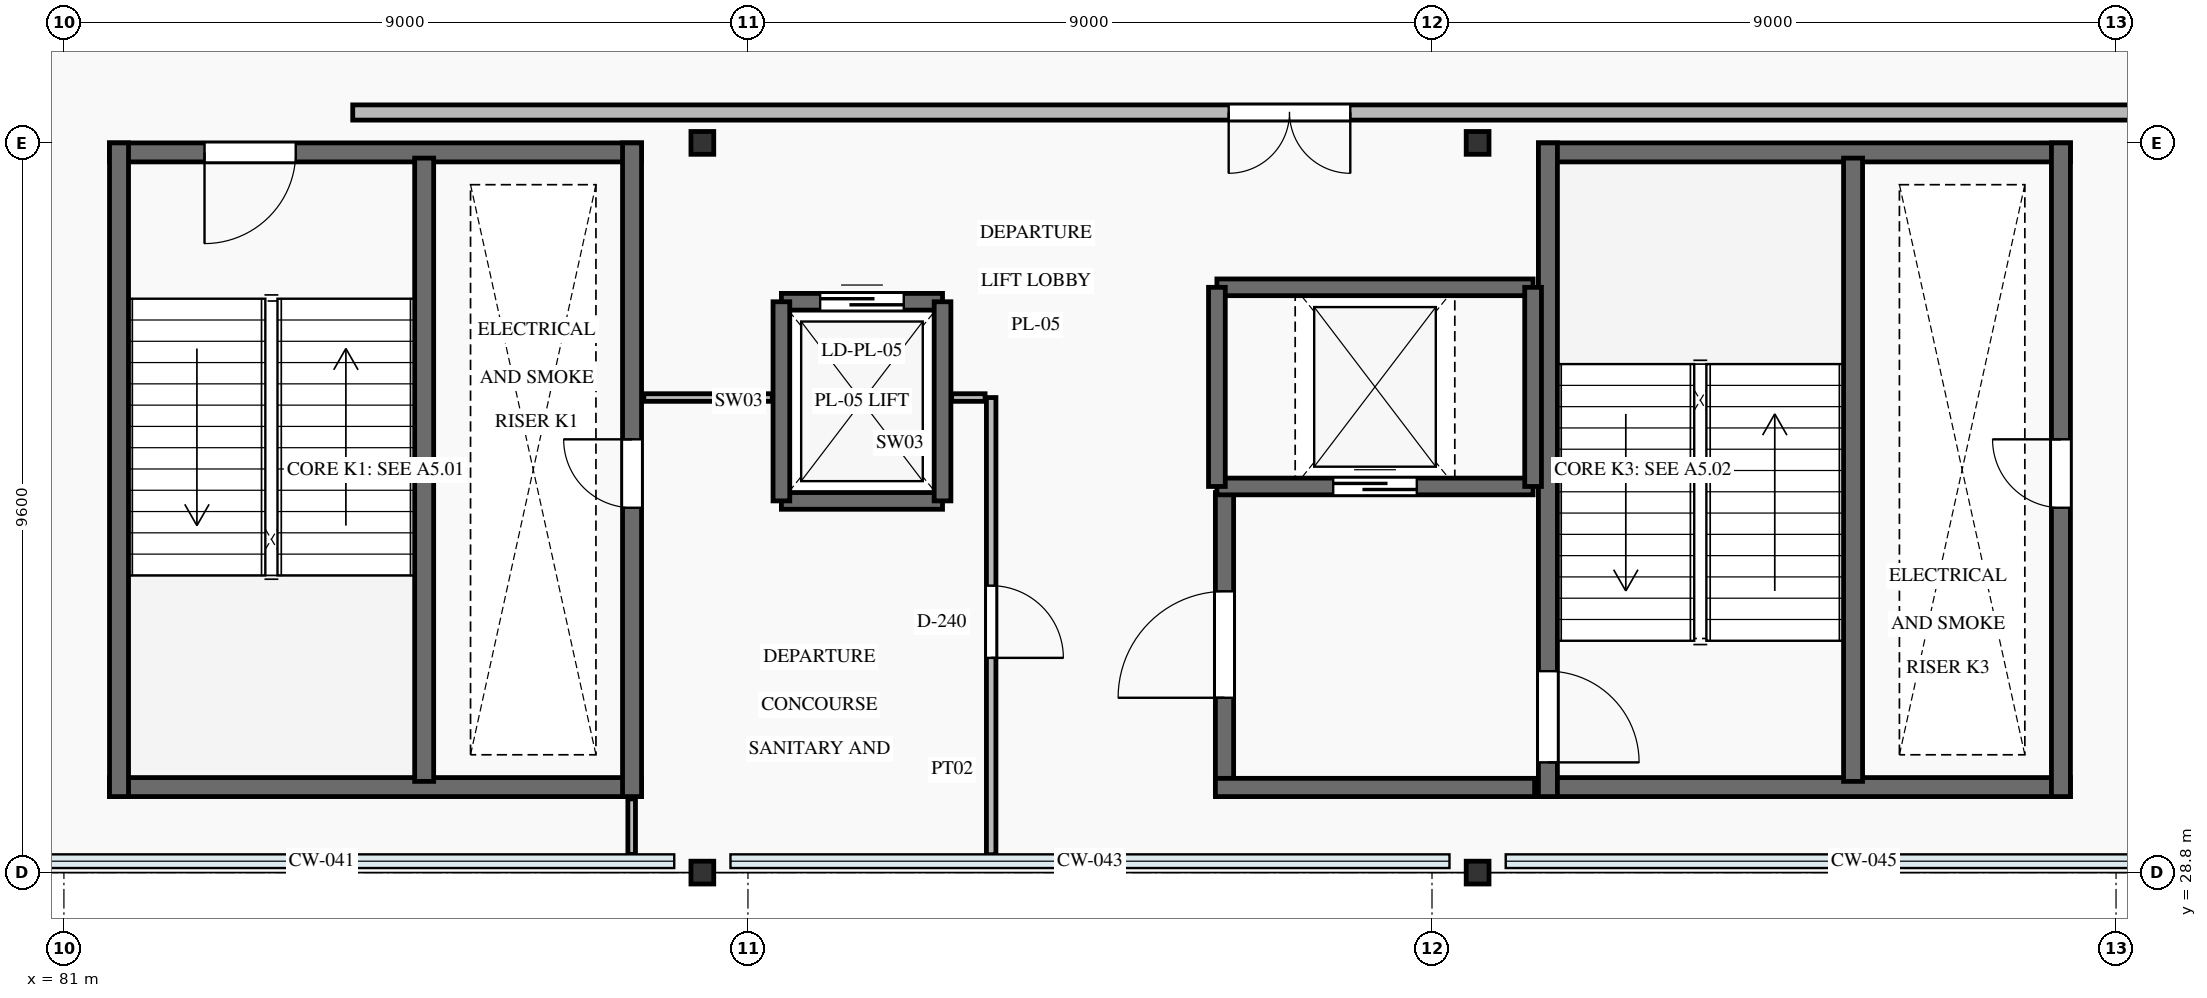
"""IFC4 building model, lengths in metres.
Left out: names, types, materials, properties, quantities, classifications, styles, units other than length and angle.
Written with IfcOpenShell. Run it as: python <this file> out.ifc"""

import sys

from ifc_helpers import new_model, si_unit, direction, frame, frame_2d, origin, origin_2d, place, context, subcontext, project, spatial, rectangle, i_section, extrude, element, fill, save


model = new_model("IFC4")
c1 = context("Model", 3, precision=1e-05, world=origin(), true_north=direction((0.0, 1.0)))
c2 = subcontext(c1, "Body", "Model", "MODEL_VIEW")
j1 = project(units=[si_unit("LENGTHUNIT", "METRE"), si_unit("PLANEANGLEUNIT", "RADIAN")], contexts=[c1])
p1 = place(None, origin())
s1 = spatial("IfcSite", under=j1, at=p1, CompositionType="ELEMENT")
p2 = place(p1, origin())
s2 = spatial("IfcBuilding", under=s1, at=p2, CompositionType="ELEMENT")
p3 = place(p2, frame((0.0, 0.0, 6.0)))
s3 = spatial("IfcBuildingStorey", under=s2, at=p3, CompositionType="ELEMENT", Elevation=6.0)
for number, where, z_axis, x_axis in (
    (1, (89.4, 28.8, 0.0), (0.0, 0.0, 1.0), (1.0, 0.0, 0.0)),
    (2, (89.4, 38.4, 0.0), (0.0, 0.0, 1.0), (1.0, 0.0, 0.0)),
    (3, (99.6, 28.8, 0.0), (0.0, 0.0, 1.0), (1.0, 0.0, 0.0)),
    (4, (99.6, 38.4, 0.0), (0.0, 0.0, 1.0), (1.0, 0.0, 0.0)),
):
    element("IfcColumn", number, at=place(p3, frame(where, z_axis=z_axis, x_axis=x_axis)), inside=s3, PredefinedType="COLUMN", context=c2, shape_type="SweptSolid", body=[
        extrude(i_section(OverallWidth=0.3, OverallDepth=0.3, WebThickness=0.011, FlangeThickness=0.019, FilletRadius=0.027, at=origin_2d()), origin(), (0.0, 0.0, 1.0), 4.8),
    ])
p4 = place(p3, frame((81.6, 29.925, 0.0), z_axis=(0.0, 0.0, 1.0), x_axis=(1.0, 0.0, 0.0)))
e5 = element("IfcWall", 5, at=p4, inside=s3, PredefinedType="SHEAR", context=c2, shape_type="SweptSolid", body=[
    extrude(rectangle(XDim=7.0, YDim=0.25, at=frame_2d((3.5, 0.0))), origin(), (0.0, 0.0, 1.0), 4.8),
])
p5 = place(p3, frame((81.6, 38.275, 0.0), z_axis=(0.0, 0.0, 1.0), x_axis=(1.0, 0.0, 0.0)))
e6 = element("IfcWall", 6, at=p5, inside=s3, PredefinedType="SHEAR", context=c2, shape_type="SweptSolid", body=[
    extrude(rectangle(XDim=7.0, YDim=0.25, at=frame_2d((3.5, 0.0))), origin(), (0.0, 0.0, 1.0), 4.8),
])
p6 = place(p5, frame((1.25, 0.0, 0.0)))
e7 = element("IfcOpeningElement", 7, at=p6, cuts=e6, PredefinedType="OPENING", context=c2, shape_type="SweptSolid", body=[
    extrude(rectangle(XDim=1.2, YDim=2.15, at=frame_2d((0.6, 1.075))), frame((0.0, 0.14, 0.0), z_axis=(0.0, -1.0, 0.0), x_axis=(1.0, 0.0, 0.0)), (0.0, 0.0, 1.0), 0.28),
])
p7 = place(p3, frame((81.725, 29.8, 0.0), z_axis=(0.0, 0.0, 1.0), x_axis=(0.0, 1.0, 0.0)))
e8 = element("IfcWall", 8, at=p7, inside=s3, PredefinedType="SHEAR", context=c2, shape_type="SweptSolid", body=[
    extrude(rectangle(XDim=8.6, YDim=0.25, at=frame_2d((4.3, 0.0))), origin(), (0.0, 0.0, 1.0), 4.8),
])
p8 = place(p3, frame((88.475, 29.8, 0.0), z_axis=(0.0, 0.0, 1.0), x_axis=(0.0, 1.0, 0.0)))
e9 = element("IfcWall", 9, at=p8, inside=s3, PredefinedType="SHEAR", context=c2, shape_type="SweptSolid", body=[
    extrude(rectangle(XDim=8.6, YDim=0.25, at=frame_2d((4.3, 0.0))), origin(), (0.0, 0.0, 1.0), 4.8),
])
p9 = place(p8, frame((3.8, 0.0, 0.0)))
e10 = element("IfcOpeningElement", 10, at=p9, cuts=e9, PredefinedType="OPENING", context=c2, shape_type="SweptSolid", body=[
    extrude(rectangle(XDim=0.9, YDim=2.05, at=frame_2d((0.45, 1.025))), frame((0.0, 0.14, 0.0), z_axis=(0.0, -1.0, 0.0), x_axis=(1.0, 0.0, 0.0)), (0.0, 0.0, 1.0), 0.28),
])
p10 = place(p3, frame((85.74, 30.0, 0.0), z_axis=(0.0, 0.0, 1.0), x_axis=(0.0, 1.0, 0.0)))
e11 = element("IfcWall", 11, at=p10, inside=s3, PredefinedType="SHEAR", context=c2, shape_type="SweptSolid", body=[
    extrude(rectangle(XDim=8.2, YDim=0.25, at=frame_2d((4.1, 0.0))), origin(), (0.0, 0.0, 1.0), 4.8),
])
for number, where, z_axis, x_axis in (
    (12, (100.4, 29.925, 0.0), (0.0, 0.0, 1.0), (1.0, 0.0, 0.0)),
    (13, (100.4, 38.275, 0.0), (0.0, 0.0, 1.0), (1.0, 0.0, 0.0)),
):
    element("IfcWall", number, at=place(p3, frame(where, z_axis=z_axis, x_axis=x_axis)), inside=s3, PredefinedType="SHEAR", context=c2, shape_type="SweptSolid", body=[
        extrude(rectangle(XDim=7.0, YDim=0.25, at=frame_2d((3.5, 0.0))), origin(), (0.0, 0.0, 1.0), 4.8),
    ])
p11 = place(p3, frame((100.525, 29.8, 0.0), z_axis=(0.0, 0.0, 1.0), x_axis=(0.0, 1.0, 0.0)))
e14 = element("IfcWall", 14, at=p11, inside=s3, PredefinedType="SHEAR", context=c2, shape_type="SweptSolid", body=[
    extrude(rectangle(XDim=8.6, YDim=0.25, at=frame_2d((4.3, 0.0))), origin(), (0.0, 0.0, 1.0), 4.8),
])
p12 = place(p11, frame((0.45, 0.0, 0.0)))
e15 = element("IfcOpeningElement", 15, at=p12, cuts=e14, PredefinedType="OPENING", context=c2, shape_type="SweptSolid", body=[
    extrude(rectangle(XDim=1.2, YDim=2.15, at=frame_2d((0.6, 1.075))), frame((0.0, 0.14, 0.0), z_axis=(0.0, -1.0, 0.0), x_axis=(1.0, 0.0, 0.0)), (0.0, 0.0, 1.0), 0.28),
])
p13 = place(p3, frame((107.275, 29.8, 0.0), z_axis=(0.0, 0.0, 1.0), x_axis=(0.0, 1.0, 0.0)))
e16 = element("IfcWall", 16, at=p13, inside=s3, PredefinedType="SHEAR", context=c2, shape_type="SweptSolid", body=[
    extrude(rectangle(XDim=8.6, YDim=0.25, at=frame_2d((4.3, 0.0))), origin(), (0.0, 0.0, 1.0), 4.8),
])
p14 = place(p13, frame((3.8, 0.0, 0.0)))
e17 = element("IfcOpeningElement", 17, at=p14, cuts=e16, PredefinedType="OPENING", context=c2, shape_type="SweptSolid", body=[
    extrude(rectangle(XDim=0.9, YDim=2.05, at=frame_2d((0.45, 1.025))), frame((0.0, 0.14, 0.0), z_axis=(0.0, -1.0, 0.0), x_axis=(1.0, 0.0, 0.0)), (0.0, 0.0, 1.0), 0.28),
])
p15 = place(p3, frame((104.54, 30.0, 0.0), z_axis=(0.0, 0.0, 1.0), x_axis=(0.0, 1.0, 0.0)))
e18 = element("IfcWall", 18, at=p15, inside=s3, PredefinedType="SHEAR", context=c2, shape_type="SweptSolid", body=[
    extrude(rectangle(XDim=8.2, YDim=0.25, at=frame_2d((4.1, 0.0))), origin(), (0.0, 0.0, 1.0), 4.8),
])
p16 = place(p3, frame((96.27, 29.8, 0.0), z_axis=(0.0, 0.0, 1.0), x_axis=(0.0, 1.0, 0.0)))
e19 = element("IfcWall", 19, at=p16, inside=s3, PredefinedType="SHEAR", context=c2, shape_type="SweptSolid", body=[
    extrude(rectangle(XDim=4.0, YDim=0.24, at=frame_2d((2.0, 0.0))), origin(), (0.0, 0.0, 1.0), 4.8),
])
p17 = place(p16, frame((1.3, 0.0, 0.0)))
e20 = element("IfcOpeningElement", 20, at=p17, cuts=e19, PredefinedType="OPENING", context=c2, shape_type="SweptSolid", body=[
    extrude(rectangle(XDim=1.4, YDim=2.2, at=frame_2d((0.7, 1.1))), frame((0.0, 0.135, 0.0), z_axis=(0.0, -1.0, 0.0), x_axis=(1.0, 0.0, 0.0)), (0.0, 0.0, 1.0), 0.27),
])
p18 = place(p3, frame((96.15, 29.92, 0.0), z_axis=(0.0, 0.0, 1.0), x_axis=(1.0, 0.0, 0.0)))
e21 = element("IfcWall", 21, at=p18, inside=s3, PredefinedType="SHEAR", context=c2, shape_type="SweptSolid", body=[
    extrude(rectangle(XDim=4.2, YDim=0.24, at=frame_2d((2.1, 0.0))), origin(), (0.0, 0.0, 1.0), 4.8),
])
p19 = place(p3, frame((90.44, 33.69, 0.0), z_axis=(0.0, 0.0, 1.0), x_axis=(1.0, 0.0, 0.0)))
e22 = element("IfcWall", 22, at=p19, inside=s3, PredefinedType="SHEAR", context=c2, shape_type="SweptSolid", body=[
    extrude(rectangle(XDim=2.12, YDim=0.22, at=frame_2d((1.06, 0.0))), origin(), (0.0, 0.0, 1.0), 4.8),
])
p20 = place(p3, frame((90.44, 36.31, 0.0), z_axis=(0.0, 0.0, 1.0), x_axis=(1.0, 0.0, 0.0)))
e23 = element("IfcWall", 23, at=p20, inside=s3, PredefinedType="SHEAR", context=c2, shape_type="SweptSolid", body=[
    extrude(rectangle(XDim=2.12, YDim=0.22, at=frame_2d((1.06, 0.0))), origin(), (0.0, 0.0, 1.0), 4.8),
])
p21 = place(p20, frame((0.51, 0.0, 0.0)))
e24 = element("IfcOpeningElement", 24, at=p21, cuts=e23, PredefinedType="OPENING", context=c2, shape_type="SweptSolid", body=[
    extrude(rectangle(XDim=1.1, YDim=2.15, at=frame_2d((0.55, 1.075))), frame((0.0, 0.125, 0.0), z_axis=(0.0, -1.0, 0.0), x_axis=(1.0, 0.0, 0.0)), (0.0, 0.0, 1.0), 0.25),
])
for number, where, z_axis, x_axis in (
    (25, (90.44, 33.69, 0.0), (0.0, 0.0, 1.0), (0.0, 1.0, 0.0)),
    (26, (92.56, 33.69, 0.0), (0.0, 0.0, 1.0), (0.0, 1.0, 0.0)),
):
    element("IfcWall", number, at=place(p3, frame(where, z_axis=z_axis, x_axis=x_axis)), inside=s3, PredefinedType="SHEAR", context=c2, shape_type="SweptSolid", body=[
        extrude(rectangle(XDim=2.62, YDim=0.22, at=frame_2d((1.31, 0.0))), origin(), (0.0, 0.0, 1.0), 4.8),
    ])
p22 = place(p3, frame((96.17, 33.88, 0.0), z_axis=(0.0, 0.0, 1.0), x_axis=(1.0, 0.0, 0.0)))
e27 = element("IfcWall", 27, at=p22, inside=s3, PredefinedType="SHEAR", context=c2, shape_type="SweptSolid", body=[
    extrude(rectangle(XDim=4.16, YDim=0.22, at=frame_2d((2.08, 0.0))), origin(), (0.0, 0.0, 1.0), 4.8),
])
p23 = place(p22, frame((1.53, 0.0, 0.0)))
e28 = element("IfcOpeningElement", 28, at=p23, cuts=e27, PredefinedType="OPENING", context=c2, shape_type="SweptSolid", body=[
    extrude(rectangle(XDim=1.1, YDim=2.15, at=frame_2d((0.55, 1.075))), frame((0.0, 0.125, 0.0), z_axis=(0.0, -1.0, 0.0), x_axis=(1.0, 0.0, 0.0)), (0.0, 0.0, 1.0), 0.25),
])
p24 = place(p3, frame((96.17, 36.5, 0.0), z_axis=(0.0, 0.0, 1.0), x_axis=(1.0, 0.0, 0.0)))
e29 = element("IfcWall", 29, at=p24, inside=s3, PredefinedType="SHEAR", context=c2, shape_type="SweptSolid", body=[
    extrude(rectangle(XDim=4.16, YDim=0.22, at=frame_2d((2.08, 0.0))), origin(), (0.0, 0.0, 1.0), 4.8),
])
for number, where, z_axis, x_axis in (
    (30, (96.17, 33.88, 0.0), (0.0, 0.0, 1.0), (0.0, 1.0, 0.0)),
    (31, (100.33, 33.88, 0.0), (0.0, 0.0, 1.0), (0.0, 1.0, 0.0)),
):
    element("IfcWall", number, at=place(p3, frame(where, z_axis=z_axis, x_axis=x_axis)), inside=s3, PredefinedType="SHEAR", context=c2, shape_type="SweptSolid", body=[
        extrude(rectangle(XDim=2.62, YDim=0.22, at=frame_2d((1.31, 0.0))), origin(), (0.0, 0.0, 1.0), 4.8),
    ])
p25 = place(p3, frame((84.8, 38.8, 0.0), z_axis=(0.0, 0.0, 1.0), x_axis=(1.0, 0.0, 0.0)))
e32 = element("IfcWall", 32, at=p25, inside=s3, PredefinedType="PARTITIONING", context=c2, shape_type="SweptSolid", body=[
    extrude(rectangle(XDim=31.65, YDim=0.2, at=frame_2d((15.825, 0.0))), origin(), (0.0, 0.0, 1.0), 4.17),
])
p26 = place(p25, frame((11.525, 0.0, 0.0)))
e33 = element("IfcOpeningElement", 33, at=p26, cuts=e32, PredefinedType="OPENING", context=c2, shape_type="SweptSolid", body=[
    extrude(rectangle(XDim=1.6, YDim=2.25, at=frame_2d((0.8, 1.125))), frame((0.0, 0.115, 0.0), z_axis=(0.0, -1.0, 0.0), x_axis=(1.0, 0.0, 0.0)), (0.0, 0.0, 1.0), 0.23),
])
p27 = place(p3, frame((93.2, 29.035, 0.0), z_axis=(0.0, 0.0, 1.0), x_axis=(0.0, 1.0, 0.0)))
e34 = element("IfcWall", 34, at=p27, inside=s3, PredefinedType="PARTITIONING", context=c2, shape_type="SweptSolid", body=[
    extrude(rectangle(XDim=6.015, YDim=0.125, at=frame_2d((3.008, 0.0))), origin(), (0.0, 0.0, 1.0), 4.53),
])
p28 = place(p27, frame((2.59, 0.0, 0.0)))
e35 = element("IfcOpeningElement", 35, at=p28, cuts=e34, PredefinedType="OPENING", context=c2, shape_type="SweptSolid", body=[
    extrude(rectangle(XDim=0.95, YDim=2.1, at=frame_2d((0.475, 1.05))), frame((0.0, 0.077, 0.0), z_axis=(0.0, -1.0, 0.0), x_axis=(1.0, 0.0, 0.0)), (0.0, 0.0, 1.0), 0.155),
])
p29 = place(p3, frame((88.63, 35.05, 0.0), z_axis=(0.0, 0.0, 1.0), x_axis=(1.0, 0.0, 0.0)))
e36 = element("IfcWall", 36, at=p29, inside=s3, PredefinedType="PARTITIONING", context=c2, shape_type="SweptSolid", body=[
    extrude(rectangle(XDim=1.69, YDim=0.1, at=frame_2d((0.845, 0.0))), origin(), (0.0, 0.0, 1.0), 4.53),
])
p30 = place(p3, frame((92.68, 35.05, 0.0), z_axis=(0.0, 0.0, 1.0), x_axis=(1.0, 0.0, 0.0)))
e37 = element("IfcWall", 37, at=p30, inside=s3, PredefinedType="PARTITIONING", context=c2, shape_type="SweptSolid", body=[
    extrude(rectangle(XDim=0.44, YDim=0.1, at=frame_2d((0.22, 0.0))), origin(), (0.0, 0.0, 1.0), 4.53),
])
p31 = place(p3, frame((88.47, 29.04, 0.0), z_axis=(0.0, 0.0, 1.0), x_axis=(0.0, 1.0, 0.0)))
e38 = element("IfcWall", 38, at=p31, inside=s3, PredefinedType="PARTITIONING", context=c2, shape_type="SweptSolid", body=[
    extrude(rectangle(XDim=0.73, YDim=0.1, at=frame_2d((0.365, 0.0))), origin(), (0.0, 0.0, 1.0), 4.53),
])
p32 = place(p6, frame((1.2, 0.0, 0.0), z_axis=(0.0, 0.0, 1.0), x_axis=(-1.0, 0.0, 0.0)))
e39 = element("IfcDoor", 39, at=p32, inside=s3, OperationType="SINGLE_SWING_LEFT", PredefinedType="DOOR", context=c2, shape_type="SweptSolid", body=[
    extrude(rectangle(XDim=1.2, YDim=2.15, at=frame_2d((0.6, 1.075))), frame((0.0, 0.025, 0.0), z_axis=(0.0, -1.0, 0.0), x_axis=(1.0, 0.0, 0.0)), (0.0, 0.0, 1.0), 0.05),
])
fill(e7, e39)
p33 = place(p9, origin())
e40 = element("IfcDoor", 40, at=p33, inside=s3, OperationType="SINGLE_SWING_RIGHT", PredefinedType="DOOR", context=c2, shape_type="SweptSolid", body=[
    extrude(rectangle(XDim=0.9, YDim=2.05, at=frame_2d((0.45, 1.025))), frame((0.0, 0.025, 0.0), z_axis=(0.0, -1.0, 0.0), x_axis=(1.0, 0.0, 0.0)), (0.0, 0.0, 1.0), 0.05),
])
fill(e10, e40)
p34 = place(p12, frame((1.2, 0.0, 0.0), z_axis=(0.0, 0.0, 1.0), x_axis=(-1.0, 0.0, 0.0)))
e41 = element("IfcDoor", 41, at=p34, inside=s3, OperationType="SINGLE_SWING_LEFT", PredefinedType="DOOR", context=c2, shape_type="SweptSolid", body=[
    extrude(rectangle(XDim=1.2, YDim=2.15, at=frame_2d((0.6, 1.075))), frame((0.0, 0.025, 0.0), z_axis=(0.0, -1.0, 0.0), x_axis=(1.0, 0.0, 0.0)), (0.0, 0.0, 1.0), 0.05),
])
fill(e15, e41)
p35 = place(p14, origin())
e42 = element("IfcDoor", 42, at=p35, inside=s3, OperationType="SINGLE_SWING_RIGHT", PredefinedType="DOOR", context=c2, shape_type="SweptSolid", body=[
    extrude(rectangle(XDim=0.9, YDim=2.05, at=frame_2d((0.45, 1.025))), frame((0.0, 0.025, 0.0), z_axis=(0.0, -1.0, 0.0), x_axis=(1.0, 0.0, 0.0)), (0.0, 0.0, 1.0), 0.05),
])
fill(e17, e42)
p36 = place(p17, origin())
e43 = element("IfcDoor", 43, at=p36, inside=s3, OperationType="SINGLE_SWING_LEFT", PredefinedType="DOOR", context=c2, shape_type="SweptSolid", body=[
    extrude(rectangle(XDim=1.4, YDim=2.2, at=frame_2d((0.7, 1.1))), frame((0.0, 0.025, 0.0), z_axis=(0.0, -1.0, 0.0), x_axis=(1.0, 0.0, 0.0)), (0.0, 0.0, 1.0), 0.05),
])
fill(e20, e43)
p37 = place(p21, origin())
e44 = element("IfcDoor", 44, at=p37, inside=s3, OperationType="SLIDING_TO_LEFT", PredefinedType="DOOR", context=c2, shape_type="SweptSolid", body=[
    extrude(rectangle(XDim=1.1, YDim=2.15, at=frame_2d((0.55, 1.075))), frame((0.0, 0.025, 0.0), z_axis=(0.0, -1.0, 0.0), x_axis=(1.0, 0.0, 0.0)), (0.0, 0.0, 1.0), 0.05),
])
fill(e24, e44)
p38 = place(p23, origin())
e45 = element("IfcDoor", 45, at=p38, inside=s3, OperationType="SLIDING_TO_RIGHT", PredefinedType="DOOR", context=c2, shape_type="SweptSolid", body=[
    extrude(rectangle(XDim=1.1, YDim=2.15, at=frame_2d((0.55, 1.075))), frame((0.0, 0.025, 0.0), z_axis=(0.0, -1.0, 0.0), x_axis=(1.0, 0.0, 0.0)), (0.0, 0.0, 1.0), 0.05),
])
fill(e28, e45)
p39 = place(p26, frame((1.6, 0.0, 0.0), z_axis=(0.0, 0.0, 1.0), x_axis=(-1.0, 0.0, 0.0)))
e46 = element("IfcDoor", 46, at=p39, inside=s3, OperationType="DOUBLE_DOOR_SINGLE_SWING", PredefinedType="DOOR", context=c2, shape_type="SweptSolid", body=[
    extrude(rectangle(XDim=1.6, YDim=2.25, at=frame_2d((0.8, 1.125))), frame((0.0, 0.025, 0.0), z_axis=(0.0, -1.0, 0.0), x_axis=(1.0, 0.0, 0.0)), (0.0, 0.0, 1.0), 0.05),
])
fill(e33, e46)
p40 = place(p28, frame((0.95, 0.0, 0.0), z_axis=(0.0, 0.0, 1.0), x_axis=(-1.0, 0.0, 0.0)))
e47 = element("IfcDoor", 47, at=p40, inside=s3, OperationType="SINGLE_SWING_LEFT", PredefinedType="DOOR", context=c2, shape_type="SweptSolid", body=[
    extrude(rectangle(XDim=0.95, YDim=2.1, at=frame_2d((0.475, 1.05))), frame((0.0, 0.025, 0.0), z_axis=(0.0, -1.0, 0.0), x_axis=(1.0, 0.0, 0.0)), (0.0, 0.0, 1.0), 0.05),
])
fill(e35, e47)
save(model, sys.argv[1])
